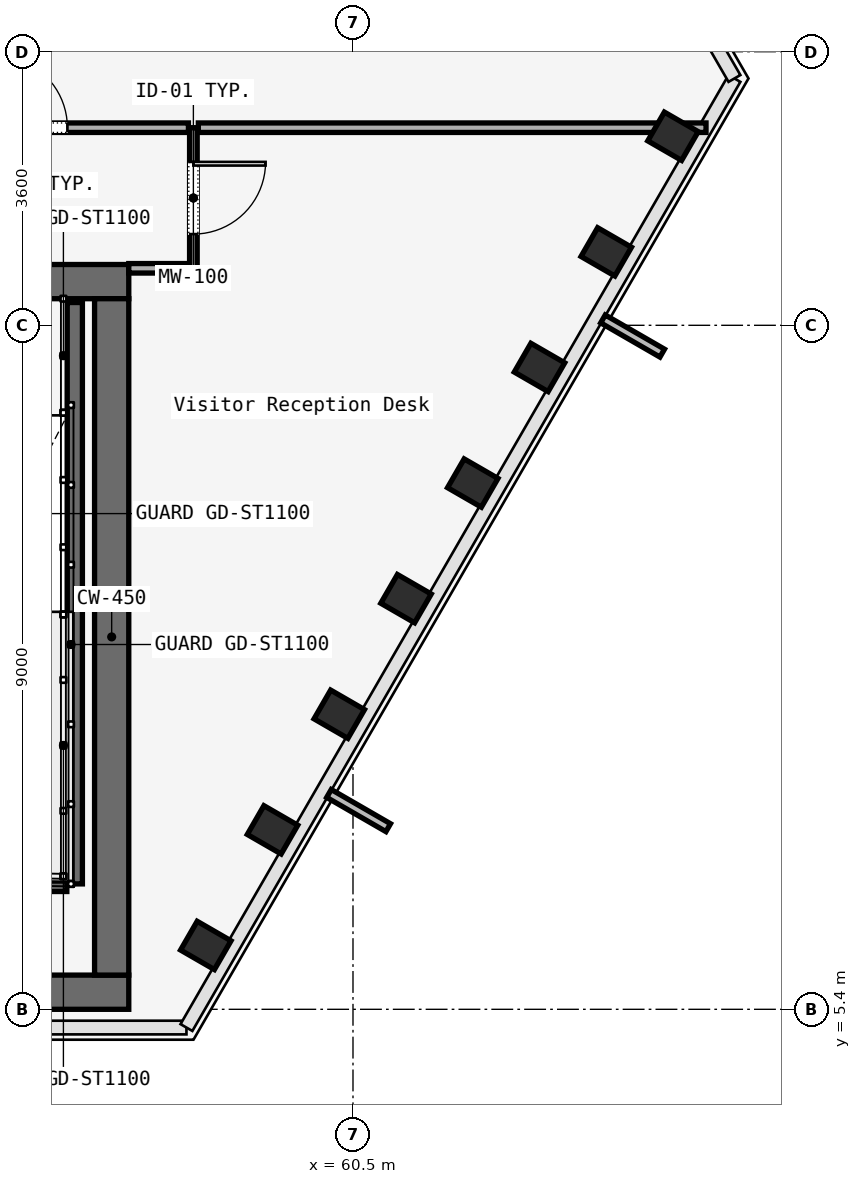
"""IFC4 building model, lengths in metres.
Left out: names, types, materials, properties, quantities, classifications, styles, units other than length and angle.
Written with IfcOpenShell. Run it as: python <this file> out.ifc"""

import sys

from ifc_helpers import new_model, si_unit, direction, frame, frame_2d, origin, origin_2d, place, context, subcontext, project, spatial, rectangle, i_section, extrude, element, fill, save


model = new_model("IFC4")
c1 = context("Model", 3, precision=1e-05, world=origin(), true_north=direction((0.0, 1.0)))
c2 = subcontext(c1, "Body", "Model", "MODEL_VIEW")
j1 = project(units=[si_unit("LENGTHUNIT", "METRE"), si_unit("PLANEANGLEUNIT", "RADIAN")], contexts=[c1])
p1 = place(None, origin())
s1 = spatial("IfcSite", under=j1, at=p1, CompositionType="ELEMENT")
p2 = place(p1, origin())
s2 = spatial("IfcBuilding", under=s1, at=p2, CompositionType="ELEMENT")
p3 = place(p2, frame((0.0, 0.0, 85.4)))
s3 = spatial("IfcBuildingStorey", under=s2, at=p3, CompositionType="ELEMENT", Elevation=85.4)
p4 = place(p3, frame((26.45, 14.975, 0.0), z_axis=(0.0, 0.0, 1.0), x_axis=(1.0, 0.0, 0.0)))
e1 = element("IfcWall", 1, at=p4, inside=s3, PredefinedType="SOLIDWALL", context=c2, shape_type="SweptSolid", body=[
    extrude(rectangle(XDim=31.1, YDim=0.45, at=frame_2d((15.55, 0.0))), origin(), (0.0, 0.0, 1.0), 3.58),
])
p5 = place(p4, frame((1.65, 0.0, 0.0)))
e2 = element("IfcOpeningElement", 2, at=p5, cuts=e1, PredefinedType="OPENING", context=c2, shape_type="SweptSolid", body=[
    extrude(rectangle(XDim=1.1, YDim=2.2, at=frame_2d((0.55, 1.1))), frame((0.0, 0.225, 0.0), z_axis=(0.0, -1.0, 0.0), x_axis=(1.0, 0.0, 0.0)), (0.0, 0.0, 1.0), 0.45),
])
p6 = place(p4, frame((13.65, 0.0, 0.0)))
e3 = element("IfcOpeningElement", 3, at=p6, cuts=e1, PredefinedType="OPENING", context=c2, shape_type="SweptSolid", body=[
    extrude(rectangle(XDim=1.1, YDim=2.2, at=frame_2d((0.55, 1.1))), frame((0.0, 0.225, 0.0), z_axis=(0.0, -1.0, 0.0), x_axis=(1.0, 0.0, 0.0)), (0.0, 0.0, 1.0), 0.45),
])
p7 = place(p4, frame((25.55, 0.0, 0.0)))
e4 = element("IfcOpeningElement", 4, at=p7, cuts=e1, PredefinedType="OPENING", context=c2, shape_type="SweptSolid", body=[
    extrude(rectangle(XDim=1.1, YDim=2.2, at=frame_2d((0.55, 1.1))), frame((0.0, 0.225, 0.0), z_axis=(0.0, -1.0, 0.0), x_axis=(1.0, 0.0, 0.0)), (0.0, 0.0, 1.0), 0.45),
])
p8 = place(p4, frame((10.7, 0.0, 0.0)))
e5 = element("IfcOpeningElement", 5, at=p8, cuts=e1, PredefinedType="OPENING", context=c2, shape_type="SweptSolid", body=[
    extrude(rectangle(XDim=1.4, YDim=2.2, at=frame_2d((0.7, 1.1))), frame((0.0, 0.225, 0.0), z_axis=(0.0, -1.0, 0.0), x_axis=(1.0, 0.0, 0.0)), (0.0, 0.0, 1.0), 0.45),
])
p9 = place(p4, frame((19.35, 0.0, 0.0)))
e6 = element("IfcOpeningElement", 6, at=p9, cuts=e1, PredefinedType="OPENING", context=c2, shape_type="SweptSolid", body=[
    extrude(rectangle(XDim=1.1, YDim=2.2, at=frame_2d((0.55, 1.1))), frame((0.0, 0.225, 0.0), z_axis=(0.0, -1.0, 0.0), x_axis=(1.0, 0.0, 0.0)), (0.0, 0.0, 1.0), 0.45),
])
p10 = place(p4, frame((21.4, 0.0, 0.0)))
e7 = element("IfcOpeningElement", 7, at=p10, cuts=e1, PredefinedType="OPENING", context=c2, shape_type="SweptSolid", body=[
    extrude(rectangle(XDim=0.9, YDim=2.1, at=frame_2d((0.45, 1.05))), frame((0.0, 0.225, 0.0), z_axis=(0.0, -1.0, 0.0), x_axis=(1.0, 0.0, 0.0)), (0.0, 0.0, 1.0), 0.45),
])
p11 = place(p4, frame((23.35, 0.0, 0.0)))
e8 = element("IfcOpeningElement", 8, at=p11, cuts=e1, PredefinedType="OPENING", context=c2, shape_type="SweptSolid", body=[
    extrude(rectangle(XDim=1.3, YDim=2.3, at=frame_2d((0.65, 1.15))), frame((0.0, 0.225, 0.0), z_axis=(0.0, -1.0, 0.0), x_axis=(1.0, 0.0, 0.0)), (0.0, 0.0, 1.0), 0.45),
])
p12 = place(p3, frame((26.45, 5.625, 0.0), z_axis=(0.0, 0.0, 1.0), x_axis=(1.0, 0.0, 0.0)))
e9 = element("IfcWall", 9, at=p12, inside=s3, PredefinedType="SOLIDWALL", context=c2, shape_type="SweptSolid", body=[
    extrude(rectangle(XDim=31.1, YDim=0.45, at=frame_2d((15.55, 0.0))), origin(), (0.0, 0.0, 1.0), 3.58),
])
p13 = place(p3, frame((57.325, 5.85, 0.0), z_axis=(0.0, 0.0, 1.0), x_axis=(0.0, 1.0, 0.0)))
e10 = element("IfcWall", 10, at=p13, inside=s3, PredefinedType="SOLIDWALL", context=c2, shape_type="SweptSolid", body=[
    extrude(rectangle(XDim=8.9, YDim=0.45, at=frame_2d((4.45, 0.0))), origin(), (0.0, 0.0, 1.0), 3.58),
])
for number, where, z_axis, x_axis in (
    (11, (58.563, 6.24, 0.0), (0.0, 0.0, 1.0), (0.5, 0.866, 0.0)),
    (12, (59.441, 7.761, 0.0), (0.0, 0.0, 1.0), (0.5, 0.866, 0.0)),
    (13, (60.32, 9.282, 0.0), (0.0, 0.0, 1.0), (0.5, 0.866, 0.0)),
    (14, (61.198, 10.803, 0.0), (0.0, 0.0, 1.0), (0.5, 0.866, 0.0)),
    (15, (62.076, 12.324, 0.0), (0.0, 0.0, 1.0), (0.5, 0.866, 0.0)),
    (16, (62.954, 13.845, 0.0), (0.0, 0.0, 1.0), (0.5, 0.866, 0.0)),
    (17, (63.832, 15.366, 0.0), (0.0, 0.0, 1.0), (0.5, 0.866, 0.0)),
    (18, (64.71, 16.887, 0.0), (0.0, 0.0, 1.0), (0.5, 0.866, 0.0)),
):
    element("IfcColumn", number, at=place(p3, frame(where, z_axis=z_axis, x_axis=x_axis)), inside=s3, PredefinedType="COLUMN", context=c2, shape_type="SweptSolid", body=[
        extrude(i_section(OverallWidth=0.437, OverallDepth=0.514, WebThickness=0.061, FlangeThickness=0.077, FilletRadius=0.015, at=origin_2d()), origin(), (0.0, 0.0, 1.0), 3.58),
    ])
p14 = place(p3, frame((56.84, 14.7, 0.0), z_axis=(0.0, 0.0, 1.0), x_axis=(0.0, -1.0, 0.0)))
e19 = element("IfcWall", 19, at=p14, inside=s3, PredefinedType="SOLIDWALL", context=c2, shape_type="SweptSolid", body=[
    extrude(rectangle(XDim=7.65, YDim=0.2, at=frame_2d((3.825, 0.0))), origin(), (0.0, 0.0, 1.0), 3.8),
])
p15 = place(p3, frame((53.62, 7.05, 0.0), z_axis=(0.0, 0.0, 1.0), x_axis=(1.0, 0.0, 0.0)))
e20 = element("IfcWall", 20, at=p15, inside=s3, PredefinedType="SOLIDWALL", context=c2, shape_type="SweptSolid", body=[
    extrude(rectangle(XDim=3.115, YDim=0.2, at=frame_2d((1.558, 0.0))), origin(), (0.0, 0.0, 1.0), 3.8),
])
p16 = place(p3, frame((58.4, 17.0, 0.0), z_axis=(0.0, 0.0, 1.0), x_axis=(0.0, -1.0, 0.0)))
e21 = element("IfcWall", 21, at=p16, inside=s3, PredefinedType="MOVABLE", context=c2, shape_type="SweptSolid", body=[
    extrude(rectangle(XDim=1.85, YDim=0.1, at=frame_2d((0.925, 0.0))), origin(), (0.0, 0.0, 1.0), 2.95),
])
p17 = place(p16, frame((0.45, 0.0, 0.0)))
e22 = element("IfcOpeningElement", 22, at=p17, cuts=e21, PredefinedType="OPENING", context=c2, shape_type="SweptSolid", body=[
    extrude(rectangle(XDim=0.95, YDim=2.2, at=frame_2d((0.475, 1.1))), frame((0.0, 0.05, 0.0), z_axis=(0.0, -1.0, 0.0), x_axis=(1.0, 0.0, 0.0)), (0.0, 0.0, 1.0), 0.1),
])
p18 = place(p3, frame((58.335, 15.15, 0.0), z_axis=(0.0, 0.0, 1.0), x_axis=(-1.0, 0.0, 0.0)))
e23 = element("IfcWall", 23, at=p18, inside=s3, PredefinedType="PARTITIONING", context=c2, shape_type="SweptSolid", body=[
    extrude(rectangle(XDim=0.785, YDim=0.125, at=frame_2d((0.393, 0.0))), origin(), (0.0, 0.0, 1.0), 2.95),
])
p19 = place(p3, frame((54.2, 17.0, 0.0), z_axis=(0.0, 0.0, 1.0), x_axis=(1.0, 0.0, 0.0)))
e24 = element("IfcWall", 24, at=p19, inside=s3, PredefinedType="PARTITIONING", context=c2, shape_type="SweptSolid", body=[
    extrude(rectangle(XDim=4.135, YDim=0.125, at=frame_2d((2.067, 0.0))), origin(), (0.0, 0.0, 1.0), 2.95),
])
p20 = place(p19, frame((1.593, 0.0, 0.0)))
e25 = element("IfcOpeningElement", 25, at=p20, cuts=e24, PredefinedType="OPENING", context=c2, shape_type="SweptSolid", body=[
    extrude(rectangle(XDim=0.95, YDim=2.2, at=frame_2d((0.475, 1.1))), frame((0.0, 0.062, 0.0), z_axis=(0.0, -1.0, 0.0), x_axis=(1.0, 0.0, 0.0)), (0.0, 0.0, 1.0), 0.125),
])
p21 = place(p3, frame((58.465, 17.0, 0.0), z_axis=(0.0, 0.0, 1.0), x_axis=(1.0, 0.0, 0.0)))
e26 = element("IfcWall", 26, at=p21, inside=s3, PredefinedType="PARTITIONING", context=c2, shape_type="SweptSolid", body=[
    extrude(rectangle(XDim=6.68, YDim=0.125, at=frame_2d((3.34, 0.0))), origin(), (0.0, 0.0, 1.0), 2.95),
])
p22 = place(p17, origin())
e27 = element("IfcDoor", 27, at=p22, inside=s3, OperationType="SINGLE_SWING_LEFT", PredefinedType="DOOR", context=c2, shape_type="SweptSolid", body=[
    extrude(rectangle(XDim=0.95, YDim=2.2, at=frame_2d((0.475, 1.1))), frame((0.0, 0.025, 0.0), z_axis=(0.0, -1.0, 0.0), x_axis=(1.0, 0.0, 0.0)), (0.0, 0.0, 1.0), 0.05),
])
fill(e22, e27)
p23 = place(p20, origin())
e28 = element("IfcDoor", 28, at=p23, inside=s3, OperationType="SINGLE_SWING_RIGHT", PredefinedType="DOOR", context=c2, shape_type="SweptSolid", body=[
    extrude(rectangle(XDim=0.95, YDim=2.2, at=frame_2d((0.475, 1.1))), frame((0.0, 0.025, 0.0), z_axis=(0.0, -1.0, 0.0), x_axis=(1.0, 0.0, 0.0)), (0.0, 0.0, 1.0), 0.05),
])
fill(e25, e28)
save(model, sys.argv[1])
